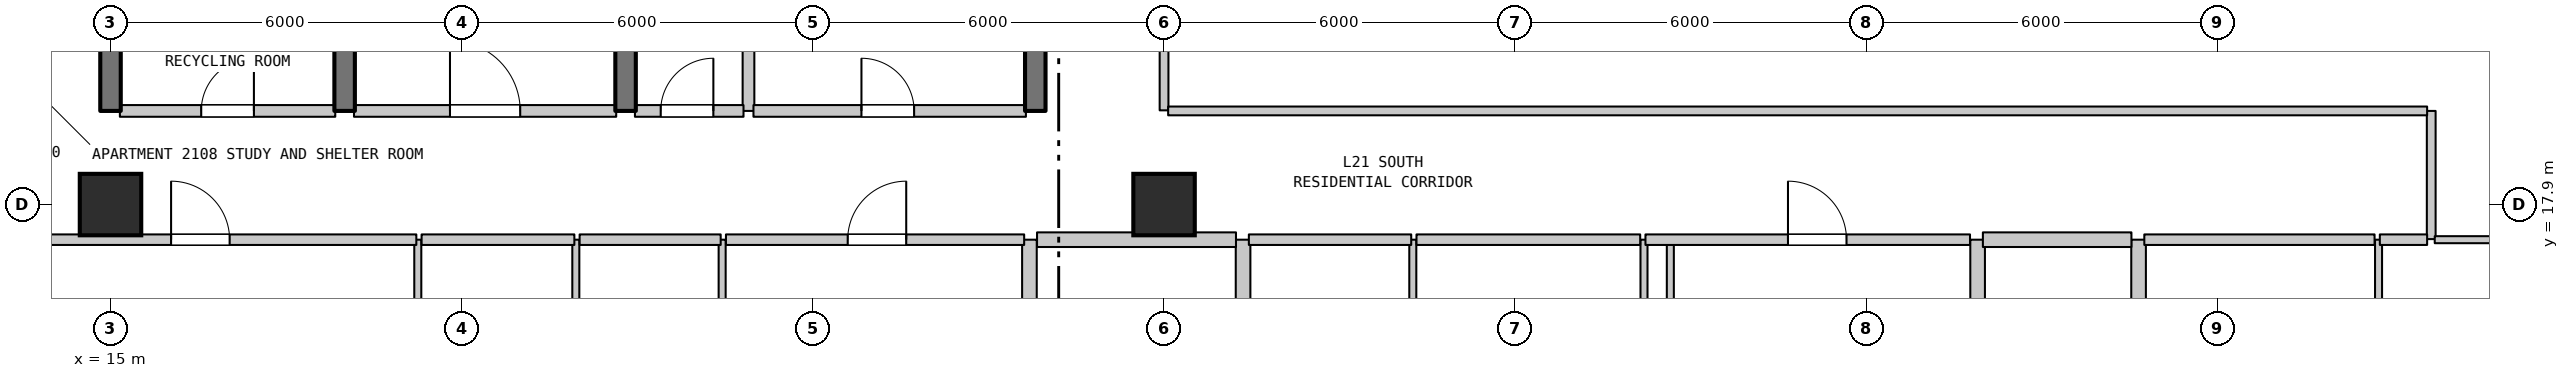
"""IFC4 building model, lengths in metres.
Left out: names, types, materials, properties, quantities, classifications, styles, units other than length and angle.
Written with IfcOpenShell. Run it as: python <this file> out.ifc"""

import sys

from ifc_helpers import new_model, si_unit, direction, frame, frame_2d, origin, origin_2d, place, context, subcontext, project, spatial, rectangle, extrude, element, fill, save


model = new_model("IFC4")
c1 = context("Model", 3, precision=1e-05, world=origin(), true_north=direction((0.0, 1.0)))
c2 = subcontext(c1, "Body", "Model", "MODEL_VIEW")
j1 = project(units=[si_unit("LENGTHUNIT", "METRE"), si_unit("PLANEANGLEUNIT", "RADIAN")], contexts=[c1])
p1 = place(None, origin())
s1 = spatial("IfcSite", under=j1, at=p1, CompositionType="ELEMENT")
p2 = place(p1, origin())
s2 = spatial("IfcBuilding", under=s1, at=p2, CompositionType="ELEMENT")
p3 = place(p2, frame((0.0, 0.0, 90.9)))
s3 = spatial("IfcBuildingStorey", under=s2, at=p3, CompositionType="ELEMENT", Elevation=90.9)
for number, where, z_axis, x_axis in (
    (1, (15.0, 17.9, 0.0), (0.0, 0.0, 1.0), (1.0, 0.0, 0.0)),
    (2, (33.0, 17.9, 0.0), (0.0, 0.0, 1.0), (1.0, 0.0, 0.0)),
):
    element("IfcColumn", number, at=place(p3, frame(where, z_axis=z_axis, x_axis=x_axis)), inside=s3, PredefinedType="COLUMN", context=c2, shape_type="SweptSolid", body=[
        extrude(rectangle(XDim=1.05, YDim=1.05, at=origin_2d()), origin(), (0.0, 0.0, 1.0), 3.7),
    ])
for number, where, z_axis, x_axis in (
    (3, (15.0, 19.5, 0.0), (0.0, 0.0, 1.0), (0.0, 1.0, 0.0)),
    (4, (19.0, 19.5, 0.0), (0.0, 0.0, 1.0), (0.0, 1.0, 0.0)),
):
    element("IfcWall", number, at=place(p3, frame(where, z_axis=z_axis, x_axis=x_axis)), inside=s3, PredefinedType="SHEAR", context=c2, shape_type="SweptSolid", body=[
        extrude(rectangle(XDim=3.2, YDim=0.35, at=frame_2d((1.6, 0.0))), origin(), (0.0, 0.0, 1.0), 3.385),
    ])
p4 = place(p3, frame((20.25, 14.1, 0.0), z_axis=(0.0, 0.0, 1.0), x_axis=(0.0, 1.0, 0.0)))
e5 = element("IfcWall", 5, at=p4, inside=s3, PredefinedType="PARTITIONING", context=c2, shape_type="SweptSolid", body=[
    extrude(rectangle(XDim=3.2, YDim=0.12, at=frame_2d((1.6, 0.0))), origin(), (0.0, 0.0, 1.0), 3.385),
])
p5 = place(p4, frame((1.15, 0.0, 0.0)))
e6 = element("IfcOpeningElement", 6, at=p5, cuts=e5, PredefinedType="OPENING", context=c2, shape_type="SweptSolid", body=[
    extrude(rectangle(XDim=0.9, YDim=2.15, at=frame_2d((0.45, 1.075))), frame((0.0, 0.07, 0.0), z_axis=(0.0, -1.0, 0.0), x_axis=(1.0, 0.0, 0.0)), (0.0, 0.0, 1.0), 0.14),
])
p6 = place(p3, frame((22.95, 14.1, 0.0), z_axis=(0.0, 0.0, 1.0), x_axis=(0.0, 1.0, 0.0)))
e7 = element("IfcWall", 7, at=p6, inside=s3, PredefinedType="PARTITIONING", context=c2, shape_type="SweptSolid", body=[
    extrude(rectangle(XDim=3.2, YDim=0.12, at=frame_2d((1.6, 0.0))), origin(), (0.0, 0.0, 1.0), 3.385),
])
p7 = place(p3, frame((23.8, 19.5, 0.0), z_axis=(0.0, 0.0, 1.0), x_axis=(0.0, 1.0, 0.0)))
e8 = element("IfcWall", 8, at=p7, inside=s3, PredefinedType="SHEAR", context=c2, shape_type="SweptSolid", body=[
    extrude(rectangle(XDim=3.2, YDim=0.35, at=frame_2d((1.6, 0.0))), origin(), (0.0, 0.0, 1.0), 3.385),
])
p8 = place(p3, frame((25.45, 14.85, 0.0), z_axis=(0.0, 0.0, 1.0), x_axis=(0.0, 1.0, 0.0)))
e9 = element("IfcWall", 9, at=p8, inside=s3, PredefinedType="PARTITIONING", context=c2, shape_type="SweptSolid", body=[
    extrude(rectangle(XDim=2.45, YDim=0.12, at=frame_2d((1.225, 0.0))), origin(), (0.0, 0.0, 1.0), 3.385),
])
p9 = place(p3, frame((25.9, 19.5, 0.0), z_axis=(0.0, 0.0, 1.0), x_axis=(0.0, 1.0, 0.0)))
e10 = element("IfcWall", 10, at=p9, inside=s3, PredefinedType="STANDARD", context=c2, shape_type="SweptSolid", body=[
    extrude(rectangle(XDim=3.2, YDim=0.2, at=frame_2d((1.6, 0.0))), origin(), (0.0, 0.0, 1.0), 3.385),
])
p10 = place(p3, frame((30.7, 11.15, 0.0), z_axis=(0.0, 0.0, 1.0), x_axis=(0.0, 1.0, 0.0)))
e11 = element("IfcWall", 11, at=p10, inside=s3, PredefinedType="STANDARD", context=c2, shape_type="SweptSolid", body=[
    extrude(rectangle(XDim=6.15, YDim=0.25, at=frame_2d((3.075, 0.0))), origin(), (0.0, 0.0, 1.0), 3.385),
])
p11 = place(p3, frame((30.8, 19.5, 0.0), z_axis=(0.0, 0.0, 1.0), x_axis=(0.0, 1.0, 0.0)))
e12 = element("IfcWall", 12, at=p11, inside=s3, PredefinedType="SHEAR", context=c2, shape_type="SweptSolid", body=[
    extrude(rectangle(XDim=3.2, YDim=0.35, at=frame_2d((1.6, 0.0))), origin(), (0.0, 0.0, 1.0), 3.385),
])
p12 = place(p3, frame((33.0, 19.51, 0.0), z_axis=(0.0, 0.0, 1.0), x_axis=(0.0, 1.0, 0.0)))
e13 = element("IfcWall", 13, at=p12, inside=s3, PredefinedType="STANDARD", context=c2, shape_type="SweptSolid", body=[
    extrude(rectangle(XDim=6.18, YDim=0.15, at=frame_2d((3.09, 0.0))), origin(), (0.0, 0.0, 1.0), 2.935),
])
p13 = place(p3, frame((34.35, 11.15, 0.0), z_axis=(0.0, 0.0, 1.0), x_axis=(0.0, 1.0, 0.0)))
e14 = element("IfcWall", 14, at=p13, inside=s3, PredefinedType="STANDARD", context=c2, shape_type="SweptSolid", body=[
    extrude(rectangle(XDim=6.15, YDim=0.25, at=frame_2d((3.075, 0.0))), origin(), (0.0, 0.0, 1.0), 3.385),
])
for number, where, z_axis, x_axis in (
    (15, (37.25, 11.15, 0.0), (0.0, 0.0, 1.0), (0.0, 1.0, 0.0)),
    (16, (41.2, 11.15, 0.0), (0.0, 0.0, 1.0), (0.0, 1.0, 0.0)),
):
    element("IfcWall", number, at=place(p3, frame(where, z_axis=z_axis, x_axis=x_axis)), inside=s3, PredefinedType="PARTITIONING", context=c2, shape_type="SweptSolid", body=[
        extrude(rectangle(XDim=6.15, YDim=0.12, at=frame_2d((3.075, 0.0))), origin(), (0.0, 0.0, 1.0), 3.385),
    ])
p14 = place(p3, frame((41.65, 14.85, 0.0), z_axis=(0.0, 0.0, 1.0), x_axis=(0.0, 1.0, 0.0)))
e17 = element("IfcWall", 17, at=p14, inside=s3, PredefinedType="PARTITIONING", context=c2, shape_type="SweptSolid", body=[
    extrude(rectangle(XDim=2.45, YDim=0.12, at=frame_2d((1.225, 0.0))), origin(), (0.0, 0.0, 1.0), 3.385),
])
for number, where, z_axis, x_axis in (
    (18, (46.9, 11.15, 0.0), (0.0, 0.0, 1.0), (0.0, 1.0, 0.0)),
    (19, (49.65, 11.15, 0.0), (0.0, 0.0, 1.0), (0.0, 1.0, 0.0)),
):
    element("IfcWall", number, at=place(p3, frame(where, z_axis=z_axis, x_axis=x_axis)), inside=s3, PredefinedType="STANDARD", context=c2, shape_type="SweptSolid", body=[
        extrude(rectangle(XDim=6.15, YDim=0.25, at=frame_2d((3.075, 0.0))), origin(), (0.0, 0.0, 1.0), 3.385),
    ])
p15 = place(p3, frame((53.75, 11.15, 0.0), z_axis=(0.0, 0.0, 1.0), x_axis=(0.0, 1.0, 0.0)))
e20 = element("IfcWall", 20, at=p15, inside=s3, PredefinedType="PARTITIONING", context=c2, shape_type="SweptSolid", body=[
    extrude(rectangle(XDim=6.15, YDim=0.12, at=frame_2d((3.075, 0.0))), origin(), (0.0, 0.0, 1.0), 3.385),
])
p16 = place(p3, frame((54.65, 17.31, 0.0), z_axis=(0.0, 0.0, 1.0), x_axis=(0.0, 1.0, 0.0)))
e21 = element("IfcWall", 21, at=p16, inside=s3, PredefinedType="STANDARD", context=c2, shape_type="SweptSolid", body=[
    extrude(rectangle(XDim=2.19, YDim=0.15, at=frame_2d((1.095, 0.0))), origin(), (0.0, 0.0, 1.0), 3.385),
])
p17 = place(p3, frame((12.875, 17.3, 0.0), z_axis=(0.0, 0.0, 1.0), x_axis=(1.0, 0.0, 0.0)))
e22 = element("IfcWall", 22, at=p17, inside=s3, PredefinedType="STANDARD", context=c2, shape_type="SweptSolid", body=[
    extrude(rectangle(XDim=7.35, YDim=0.18, at=frame_2d((3.675, 0.0))), origin(), (0.0, 0.0, 1.0), 3.385),
])
p18 = place(p17, frame((3.16, 0.0, 0.0)))
e23 = element("IfcOpeningElement", 23, at=p18, cuts=e22, PredefinedType="OPENING", context=c2, shape_type="SweptSolid", body=[
    extrude(rectangle(XDim=1.0, YDim=2.15, at=frame_2d((0.5, 1.075))), frame((0.0, 0.1, 0.0), z_axis=(0.0, -1.0, 0.0), x_axis=(1.0, 0.0, 0.0)), (0.0, 0.0, 1.0), 0.2),
])
p19 = place(p3, frame((20.315, 17.3, 0.0), z_axis=(0.0, 0.0, 1.0), x_axis=(1.0, 0.0, 0.0)))
e24 = element("IfcWall", 24, at=p19, inside=s3, PredefinedType="STANDARD", context=c2, shape_type="SweptSolid", body=[
    extrude(rectangle(XDim=2.61, YDim=0.18, at=frame_2d((1.305, 0.0))), origin(), (0.0, 0.0, 1.0), 3.385),
])
p20 = place(p3, frame((23.015, 17.3, 0.0), z_axis=(0.0, 0.0, 1.0), x_axis=(1.0, 0.0, 0.0)))
e25 = element("IfcWall", 25, at=p20, inside=s3, PredefinedType="STANDARD", context=c2, shape_type="SweptSolid", body=[
    extrude(rectangle(XDim=2.41, YDim=0.18, at=frame_2d((1.205, 0.0))), origin(), (0.0, 0.0, 1.0), 3.385),
])
p21 = place(p3, frame((25.515, 17.3, 0.0), z_axis=(0.0, 0.0, 1.0), x_axis=(1.0, 0.0, 0.0)))
e26 = element("IfcWall", 26, at=p21, inside=s3, PredefinedType="STANDARD", context=c2, shape_type="SweptSolid", body=[
    extrude(rectangle(XDim=5.095, YDim=0.18, at=frame_2d((2.548, 0.0))), origin(), (0.0, 0.0, 1.0), 3.385),
])
p22 = place(p21, frame((2.08, 0.0, 0.0)))
e27 = element("IfcOpeningElement", 27, at=p22, cuts=e26, PredefinedType="OPENING", context=c2, shape_type="SweptSolid", body=[
    extrude(rectangle(XDim=1.0, YDim=2.15, at=frame_2d((0.5, 1.075))), frame((0.0, 0.1, 0.0), z_axis=(0.0, -1.0, 0.0), x_axis=(1.0, 0.0, 0.0)), (0.0, 0.0, 1.0), 0.2),
])
p23 = place(p3, frame((30.83, 17.3, 0.0), z_axis=(0.0, 0.0, 1.0), x_axis=(1.0, 0.0, 0.0)))
e28 = element("IfcWall", 28, at=p23, inside=s3, PredefinedType="STANDARD", context=c2, shape_type="SweptSolid", body=[
    extrude(rectangle(XDim=3.399, YDim=0.25, at=frame_2d((1.699, 0.0))), origin(), (0.0, 0.0, 1.0), 3.385),
])
p24 = place(p3, frame((34.449, 17.3, 0.0), z_axis=(0.0, 0.0, 1.0), x_axis=(1.0, 0.0, 0.0)))
e29 = element("IfcWall", 29, at=p24, inside=s3, PredefinedType="STANDARD", context=c2, shape_type="SweptSolid", body=[
    extrude(rectangle(XDim=2.774, YDim=0.18, at=frame_2d((1.387, 0.0))), origin(), (0.0, 0.0, 1.0), 3.385),
])
p25 = place(p3, frame((37.313, 17.3, 0.0), z_axis=(0.0, 0.0, 1.0), x_axis=(1.0, 0.0, 0.0)))
e30 = element("IfcWall", 30, at=p25, inside=s3, PredefinedType="STANDARD", context=c2, shape_type="SweptSolid", body=[
    extrude(rectangle(XDim=3.822, YDim=0.18, at=frame_2d((1.911, 0.0))), origin(), (0.0, 0.0, 1.0), 3.385),
])
p26 = place(p3, frame((41.225, 17.3, 0.0), z_axis=(0.0, 0.0, 1.0), x_axis=(1.0, 0.0, 0.0)))
e31 = element("IfcWall", 31, at=p26, inside=s3, PredefinedType="STANDARD", context=c2, shape_type="SweptSolid", body=[
    extrude(rectangle(XDim=5.545, YDim=0.18, at=frame_2d((2.772, 0.0))), origin(), (0.0, 0.0, 1.0), 3.385),
])
p27 = place(p26, frame((2.435, 0.0, 0.0)))
e32 = element("IfcOpeningElement", 32, at=p27, cuts=e31, PredefinedType="OPENING", context=c2, shape_type="SweptSolid", body=[
    extrude(rectangle(XDim=1.0, YDim=2.15, at=frame_2d((0.5, 1.075))), frame((0.0, 0.1, 0.0), z_axis=(0.0, -1.0, 0.0), x_axis=(1.0, 0.0, 0.0)), (0.0, 0.0, 1.0), 0.2),
])
p28 = place(p3, frame((46.99, 17.3, 0.0), z_axis=(0.0, 0.0, 1.0), x_axis=(1.0, 0.0, 0.0)))
e33 = element("IfcWall", 33, at=p28, inside=s3, PredefinedType="STANDARD", context=c2, shape_type="SweptSolid", body=[
    extrude(rectangle(XDim=2.538, YDim=0.25, at=frame_2d((1.269, 0.0))), origin(), (0.0, 0.0, 1.0), 3.385),
])
p29 = place(p3, frame((49.748, 17.3, 0.0), z_axis=(0.0, 0.0, 1.0), x_axis=(1.0, 0.0, 0.0)))
e34 = element("IfcWall", 34, at=p29, inside=s3, PredefinedType="STANDARD", context=c2, shape_type="SweptSolid", body=[
    extrude(rectangle(XDim=3.934, YDim=0.18, at=frame_2d((1.967, 0.0))), origin(), (0.0, 0.0, 1.0), 3.385),
])
p30 = place(p3, frame((53.772, 17.3, 0.0), z_axis=(0.0, 0.0, 1.0), x_axis=(1.0, 0.0, 0.0)))
e35 = element("IfcWall", 35, at=p30, inside=s3, PredefinedType="STANDARD", context=c2, shape_type="SweptSolid", body=[
    extrude(rectangle(XDim=0.808, YDim=0.18, at=frame_2d((0.404, 0.0))), origin(), (0.0, 0.0, 1.0), 3.385),
])
p31 = place(p3, frame((54.71, 17.3, 0.0), z_axis=(0.0, 0.0, 1.0), x_axis=(1.0, 0.0, 0.0)))
e36 = element("IfcWall", 36, at=p31, inside=s3, PredefinedType="PARTITIONING", context=c2, shape_type="SweptSolid", body=[
    extrude(rectangle(XDim=1.635, YDim=0.12, at=frame_2d((0.817, 0.0))), origin(), (0.0, 0.0, 1.0), 3.385),
])
p32 = place(p3, frame((15.16, 19.5, 0.0), z_axis=(0.0, 0.0, 1.0), x_axis=(1.0, 0.0, 0.0)))
e37 = element("IfcWall", 37, at=p32, inside=s3, PredefinedType="STANDARD", context=c2, shape_type="SweptSolid", body=[
    extrude(rectangle(XDim=3.68, YDim=0.2, at=frame_2d((1.84, 0.0))), origin(), (0.0, 0.0, 1.0), 3.385),
])
p33 = place(p32, frame((1.39, 0.0, 0.0)))
e38 = element("IfcOpeningElement", 38, at=p33, cuts=e37, PredefinedType="OPENING", context=c2, shape_type="SweptSolid", body=[
    extrude(rectangle(XDim=0.9, YDim=2.15, at=frame_2d((0.45, 1.075))), frame((0.0, 0.11, 0.0), z_axis=(0.0, -1.0, 0.0), x_axis=(1.0, 0.0, 0.0)), (0.0, 0.0, 1.0), 0.22),
])
p34 = place(p3, frame((19.16, 19.5, 0.0), z_axis=(0.0, 0.0, 1.0), x_axis=(1.0, 0.0, 0.0)))
e39 = element("IfcWall", 39, at=p34, inside=s3, PredefinedType="STANDARD", context=c2, shape_type="SweptSolid", body=[
    extrude(rectangle(XDim=4.48, YDim=0.2, at=frame_2d((2.24, 0.0))), origin(), (0.0, 0.0, 1.0), 3.385),
])
p35 = place(p34, frame((1.64, 0.0, 0.0)))
e40 = element("IfcOpeningElement", 40, at=p35, cuts=e39, PredefinedType="OPENING", context=c2, shape_type="SweptSolid", body=[
    extrude(rectangle(XDim=1.2, YDim=2.2, at=frame_2d((0.6, 1.1))), frame((0.0, 0.11, 0.0), z_axis=(0.0, -1.0, 0.0), x_axis=(1.0, 0.0, 0.0)), (0.0, 0.0, 1.0), 0.22),
])
p36 = place(p3, frame((23.96, 19.5, 0.0), z_axis=(0.0, 0.0, 1.0), x_axis=(1.0, 0.0, 0.0)))
e41 = element("IfcWall", 41, at=p36, inside=s3, PredefinedType="STANDARD", context=c2, shape_type="SweptSolid", body=[
    extrude(rectangle(XDim=1.855, YDim=0.2, at=frame_2d((0.927, 0.0))), origin(), (0.0, 0.0, 1.0), 3.385),
])
p37 = place(p36, frame((0.44, 0.0, 0.0)))
e42 = element("IfcOpeningElement", 42, at=p37, cuts=e41, PredefinedType="OPENING", context=c2, shape_type="SweptSolid", body=[
    extrude(rectangle(XDim=0.9, YDim=2.15, at=frame_2d((0.45, 1.075))), frame((0.0, 0.11, 0.0), z_axis=(0.0, -1.0, 0.0), x_axis=(1.0, 0.0, 0.0)), (0.0, 0.0, 1.0), 0.22),
])
p38 = place(p3, frame((25.985, 19.5, 0.0), z_axis=(0.0, 0.0, 1.0), x_axis=(1.0, 0.0, 0.0)))
e43 = element("IfcWall", 43, at=p38, inside=s3, PredefinedType="STANDARD", context=c2, shape_type="SweptSolid", body=[
    extrude(rectangle(XDim=4.655, YDim=0.2, at=frame_2d((2.327, 0.0))), origin(), (0.0, 0.0, 1.0), 3.385),
])
p39 = place(p38, frame((1.845, 0.0, 0.0)))
e44 = element("IfcOpeningElement", 44, at=p39, cuts=e43, PredefinedType="OPENING", context=c2, shape_type="SweptSolid", body=[
    extrude(rectangle(XDim=0.9, YDim=2.15, at=frame_2d((0.45, 1.075))), frame((0.0, 0.11, 0.0), z_axis=(0.0, -1.0, 0.0), x_axis=(1.0, 0.0, 0.0)), (0.0, 0.0, 1.0), 0.22),
])
p40 = place(p3, frame((33.07, 19.5, 0.0), z_axis=(0.0, 0.0, 1.0), x_axis=(1.0, 0.0, 0.0)))
e45 = element("IfcWall", 45, at=p40, inside=s3, PredefinedType="STANDARD", context=c2, shape_type="SweptSolid", body=[
    extrude(rectangle(XDim=21.51, YDim=0.15, at=frame_2d((10.755, 0.0))), origin(), (0.0, 0.0, 1.0), 3.385),
])
p41 = place(p18, origin())
e46 = element("IfcDoor", 46, at=p41, inside=s3, OperationType="SINGLE_SWING_LEFT", PredefinedType="DOOR", context=c2, shape_type="SweptSolid", body=[
    extrude(rectangle(XDim=1.0, YDim=2.15, at=frame_2d((0.5, 1.075))), frame((0.0, 0.025, 0.0), z_axis=(0.0, -1.0, 0.0), x_axis=(1.0, 0.0, 0.0)), (0.0, 0.0, 1.0), 0.05),
])
fill(e23, e46)
p42 = place(p22, origin())
e47 = element("IfcDoor", 47, at=p42, inside=s3, OperationType="SINGLE_SWING_RIGHT", PredefinedType="DOOR", context=c2, shape_type="SweptSolid", body=[
    extrude(rectangle(XDim=1.0, YDim=2.15, at=frame_2d((0.5, 1.075))), frame((0.0, 0.025, 0.0), z_axis=(0.0, -1.0, 0.0), x_axis=(1.0, 0.0, 0.0)), (0.0, 0.0, 1.0), 0.05),
])
fill(e27, e47)
p43 = place(p27, origin())
e48 = element("IfcDoor", 48, at=p43, inside=s3, OperationType="SINGLE_SWING_LEFT", PredefinedType="DOOR", context=c2, shape_type="SweptSolid", body=[
    extrude(rectangle(XDim=1.0, YDim=2.15, at=frame_2d((0.5, 1.075))), frame((0.0, 0.025, 0.0), z_axis=(0.0, -1.0, 0.0), x_axis=(1.0, 0.0, 0.0)), (0.0, 0.0, 1.0), 0.05),
])
fill(e32, e48)
p44 = place(p33, origin())
e49 = element("IfcDoor", 49, at=p44, inside=s3, OperationType="SINGLE_SWING_RIGHT", PredefinedType="DOOR", context=c2, shape_type="SweptSolid", body=[
    extrude(rectangle(XDim=0.9, YDim=2.15, at=frame_2d((0.45, 1.075))), frame((0.0, 0.025, 0.0), z_axis=(0.0, -1.0, 0.0), x_axis=(1.0, 0.0, 0.0)), (0.0, 0.0, 1.0), 0.05),
])
fill(e38, e49)
p45 = place(p35, origin())
e50 = element("IfcDoor", 50, at=p45, inside=s3, OperationType="SINGLE_SWING_LEFT", PredefinedType="DOOR", context=c2, shape_type="SweptSolid", body=[
    extrude(rectangle(XDim=1.2, YDim=2.2, at=frame_2d((0.6, 1.1))), frame((0.0, 0.025, 0.0), z_axis=(0.0, -1.0, 0.0), x_axis=(1.0, 0.0, 0.0)), (0.0, 0.0, 1.0), 0.05),
])
fill(e40, e50)
p46 = place(p37, origin())
e51 = element("IfcDoor", 51, at=p46, inside=s3, OperationType="SINGLE_SWING_RIGHT", PredefinedType="DOOR", context=c2, shape_type="SweptSolid", body=[
    extrude(rectangle(XDim=0.9, YDim=2.15, at=frame_2d((0.45, 1.075))), frame((0.0, 0.025, 0.0), z_axis=(0.0, -1.0, 0.0), x_axis=(1.0, 0.0, 0.0)), (0.0, 0.0, 1.0), 0.05),
])
fill(e42, e51)
p47 = place(p39, origin())
e52 = element("IfcDoor", 52, at=p47, inside=s3, OperationType="SINGLE_SWING_LEFT", PredefinedType="DOOR", context=c2, shape_type="SweptSolid", body=[
    extrude(rectangle(XDim=0.9, YDim=2.15, at=frame_2d((0.45, 1.075))), frame((0.0, 0.025, 0.0), z_axis=(0.0, -1.0, 0.0), x_axis=(1.0, 0.0, 0.0)), (0.0, 0.0, 1.0), 0.05),
])
fill(e44, e52)
save(model, sys.argv[1])
